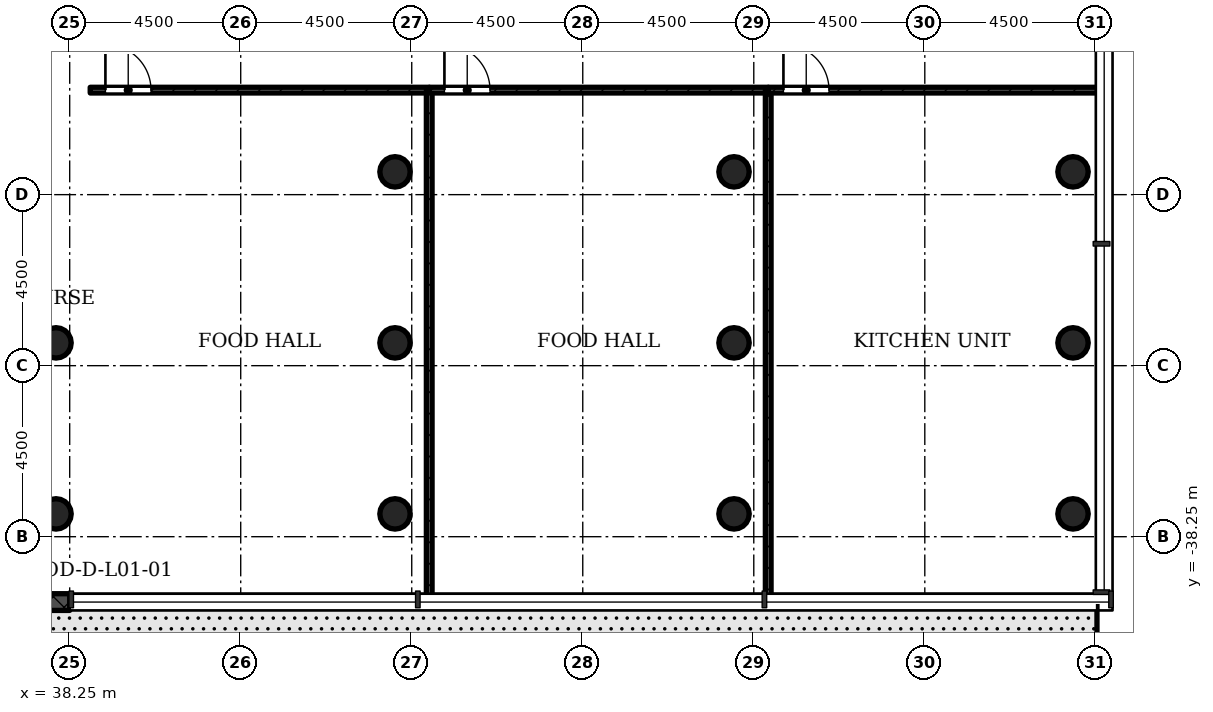
"""IFC4 building model, lengths in metres.
Left out: names, types, materials, properties, quantities, classifications, styles, units other than length and angle.
Written with IfcOpenShell. Run it as: python <this file> out.ifc"""

import sys

from ifc_helpers import new_model, si_unit, direction, frame, frame_2d, origin, origin_2d, place, context, subcontext, project, spatial, rectangle, hollow_circle, extrude, element, fill, save


model = new_model("IFC4")
c1 = context("Model", 3, precision=1e-05, world=origin(), true_north=direction((0.0, 1.0)))
c2 = subcontext(c1, "Body", "Model", "MODEL_VIEW")
j1 = project(units=[si_unit("LENGTHUNIT", "METRE"), si_unit("PLANEANGLEUNIT", "RADIAN")], contexts=[c1])
p1 = place(None, origin())
s1 = spatial("IfcSite", under=j1, at=p1, CompositionType="ELEMENT")
p2 = place(p1, origin())
s2 = spatial("IfcBuilding", under=s1, at=p2, CompositionType="ELEMENT")
p3 = place(p2, frame((0.0, 0.0, 6.0)))
s3 = spatial("IfcBuildingStorey", under=s2, at=p3, CompositionType="ELEMENT", Elevation=6.0)
for number, where, z_axis, x_axis in (
    (1, (37.89, -37.65, 0.0), (0.0, 0.0, 1.0), (1.0, 0.0, 0.0)),
    (2, (46.81, -37.65, 0.0), (0.0, 0.0, 1.0), (1.0, 0.0, 0.0)),
    (3, (55.73, -37.65, 0.0), (0.0, 0.0, 1.0), (1.0, 0.0, 0.0)),
    (4, (64.65, -37.65, 0.0), (0.0, 0.0, 1.0), (1.0, 0.0, 0.0)),
):
    element("IfcColumn", number, at=place(p3, frame(where, z_axis=z_axis, x_axis=x_axis)), inside=s3, PredefinedType="COLUMN", context=c2, shape_type="SweptSolid", body=[
        extrude(hollow_circle(Radius=0.4, WallThickness=0.028, at=origin_2d()), origin(), (0.0, 0.0, 1.0), 4.58),
    ])
for number, where, z_axis, x_axis in (
    (5, (37.89, -33.15, 0.0), (0.0, 0.0, 1.0), (1.0, 0.0, 0.0)),
    (6, (46.81, -33.15, 0.0), (0.0, 0.0, 1.0), (1.0, 0.0, 0.0)),
    (7, (55.73, -33.15, 0.0), (0.0, 0.0, 1.0), (1.0, 0.0, 0.0)),
    (8, (64.65, -33.15, 0.0), (0.0, 0.0, 1.0), (1.0, 0.0, 0.0)),
    (9, (46.81, -28.65, 0.0), (0.0, 0.0, 1.0), (1.0, 0.0, 0.0)),
    (10, (55.73, -28.65, 0.0), (0.0, 0.0, 1.0), (1.0, 0.0, 0.0)),
    (11, (64.65, -28.65, 0.0), (0.0, 0.0, 1.0), (1.0, 0.0, 0.0)),
):
    element("IfcColumn", number, at=place(p3, frame(where, z_axis=z_axis, x_axis=x_axis)), inside=s3, PredefinedType="COLUMN", context=c2, shape_type="SweptSolid", body=[
        extrude(hollow_circle(Radius=0.4, WallThickness=0.028, at=origin_2d()), origin(), (0.0, 0.0, 1.0), 5.0),
    ])
p4 = place(p3, frame((33.75, -39.97, -0.02), z_axis=(0.0, 0.0, 1.0), x_axis=(1.0, 0.0, 0.0)))
e12 = element("IfcWall", 12, at=p4, inside=s3, PredefinedType="STANDARD", context=c2, shape_type="SweptSolid", body=[
    extrude(rectangle(XDim=4.5, YDim=0.44, at=frame_2d((2.25, 0.0))), origin(), (0.0, 0.0, 1.0), 4.72),
])
p5 = place(p4, frame((1.35, 0.0, 0.02)))
e13 = element("IfcOpeningElement", 13, at=p5, cuts=e12, PredefinedType="OPENING", context=c2, shape_type="SweptSolid", body=[
    extrude(rectangle(XDim=1.8, YDim=2.1, at=frame_2d((0.9, 1.05))), frame((0.0, 0.23, 0.0), z_axis=(0.0, -1.0, 0.0), x_axis=(1.0, 0.0, 0.0)), (0.0, 0.0, 1.0), 0.46),
])
p6 = place(p3, frame((38.79, -26.5, 0.0), z_axis=(0.0, 0.0, 1.0), x_axis=(1.0, 0.0, 0.0)))
e14 = element("IfcWall", 14, at=p6, inside=s3, PredefinedType="PARTITIONING", context=c2, shape_type="SweptSolid", body=[
    extrude(rectangle(XDim=8.92, YDim=0.15, at=frame_2d((4.46, 0.0))), origin(), (0.0, 0.0, 1.0), 4.58),
])
p7 = place(p6, frame((0.4, 0.0, 0.0)))
e15 = element("IfcOpeningElement", 15, at=p7, cuts=e14, PredefinedType="OPENING", context=c2, shape_type="SweptSolid", body=[
    extrude(rectangle(XDim=1.2, YDim=2.1, at=frame_2d((0.6, 1.05))), frame((0.0, 0.085, 0.0), z_axis=(0.0, -1.0, 0.0), x_axis=(1.0, 0.0, 0.0)), (0.0, 0.0, 1.0), 0.17),
])
p8 = place(p3, frame((47.71, -26.5, 0.0), z_axis=(0.0, 0.0, 1.0), x_axis=(0.0, -1.0, 0.0)))
e16 = element("IfcWall", 16, at=p8, inside=s3, PredefinedType="PARTITIONING", context=c2, shape_type="SweptSolid", body=[
    extrude(rectangle(XDim=13.35, YDim=0.15, at=frame_2d((6.675, 0.0))), origin(), (0.0, 0.0, 1.0), 4.58),
])
p9 = place(p3, frame((47.71, -26.5, 0.0), z_axis=(0.0, 0.0, 1.0), x_axis=(1.0, 0.0, 0.0)))
e17 = element("IfcWall", 17, at=p9, inside=s3, PredefinedType="PARTITIONING", context=c2, shape_type="SweptSolid", body=[
    extrude(rectangle(XDim=8.92, YDim=0.15, at=frame_2d((4.46, 0.0))), origin(), (0.0, 0.0, 1.0), 4.58),
])
p10 = place(p9, frame((0.4, 0.0, 0.0)))
e18 = element("IfcOpeningElement", 18, at=p10, cuts=e17, PredefinedType="OPENING", context=c2, shape_type="SweptSolid", body=[
    extrude(rectangle(XDim=1.2, YDim=2.1, at=frame_2d((0.6, 1.05))), frame((0.0, 0.085, 0.0), z_axis=(0.0, -1.0, 0.0), x_axis=(1.0, 0.0, 0.0)), (0.0, 0.0, 1.0), 0.17),
])
p11 = place(p3, frame((56.63, -26.5, 0.0), z_axis=(0.0, 0.0, 1.0), x_axis=(0.0, -1.0, 0.0)))
e19 = element("IfcWall", 19, at=p11, inside=s3, PredefinedType="PARTITIONING", context=c2, shape_type="SweptSolid", body=[
    extrude(rectangle(XDim=13.35, YDim=0.15, at=frame_2d((6.675, 0.0))), origin(), (0.0, 0.0, 1.0), 4.58),
])
p12 = place(p3, frame((56.63, -26.5, 0.0), z_axis=(0.0, 0.0, 1.0), x_axis=(1.0, 0.0, 0.0)))
e20 = element("IfcWall", 20, at=p12, inside=s3, PredefinedType="PARTITIONING", context=c2, shape_type="SweptSolid", body=[
    extrude(rectangle(XDim=8.72, YDim=0.15, at=frame_2d((4.36, 0.0))), origin(), (0.0, 0.0, 1.0), 4.58),
])
p13 = place(p12, frame((0.4, 0.0, 0.0)))
e21 = element("IfcOpeningElement", 21, at=p13, cuts=e20, PredefinedType="OPENING", context=c2, shape_type="SweptSolid", body=[
    extrude(rectangle(XDim=1.2, YDim=2.1, at=frame_2d((0.6, 1.05))), frame((0.0, 0.085, 0.0), z_axis=(0.0, -1.0, 0.0), x_axis=(1.0, 0.0, 0.0)), (0.0, 0.0, 1.0), 0.17),
])
p14 = place(p7, origin())
e22 = element("IfcDoor", 22, at=p14, inside=s3, OperationType="SINGLE_SWING_RIGHT", PredefinedType="DOOR", context=c2, shape_type="SweptSolid", body=[
    extrude(rectangle(XDim=1.2, YDim=2.1, at=frame_2d((0.6, 1.05))), frame((0.0, 0.025, 0.0), z_axis=(0.0, -1.0, 0.0), x_axis=(1.0, 0.0, 0.0)), (0.0, 0.0, 1.0), 0.05),
])
fill(e15, e22)
p15 = place(p10, origin())
e23 = element("IfcDoor", 23, at=p15, inside=s3, OperationType="SINGLE_SWING_RIGHT", PredefinedType="DOOR", context=c2, shape_type="SweptSolid", body=[
    extrude(rectangle(XDim=1.2, YDim=2.1, at=frame_2d((0.6, 1.05))), frame((0.0, 0.025, 0.0), z_axis=(0.0, -1.0, 0.0), x_axis=(1.0, 0.0, 0.0)), (0.0, 0.0, 1.0), 0.05),
])
fill(e18, e23)
p16 = place(p13, origin())
e24 = element("IfcDoor", 24, at=p16, inside=s3, OperationType="SINGLE_SWING_RIGHT", PredefinedType="DOOR", context=c2, shape_type="SweptSolid", body=[
    extrude(rectangle(XDim=1.2, YDim=2.1, at=frame_2d((0.6, 1.05))), frame((0.0, 0.025, 0.0), z_axis=(0.0, -1.0, 0.0), x_axis=(1.0, 0.0, 0.0)), (0.0, 0.0, 1.0), 0.05),
])
fill(e21, e24)
save(model, sys.argv[1])
